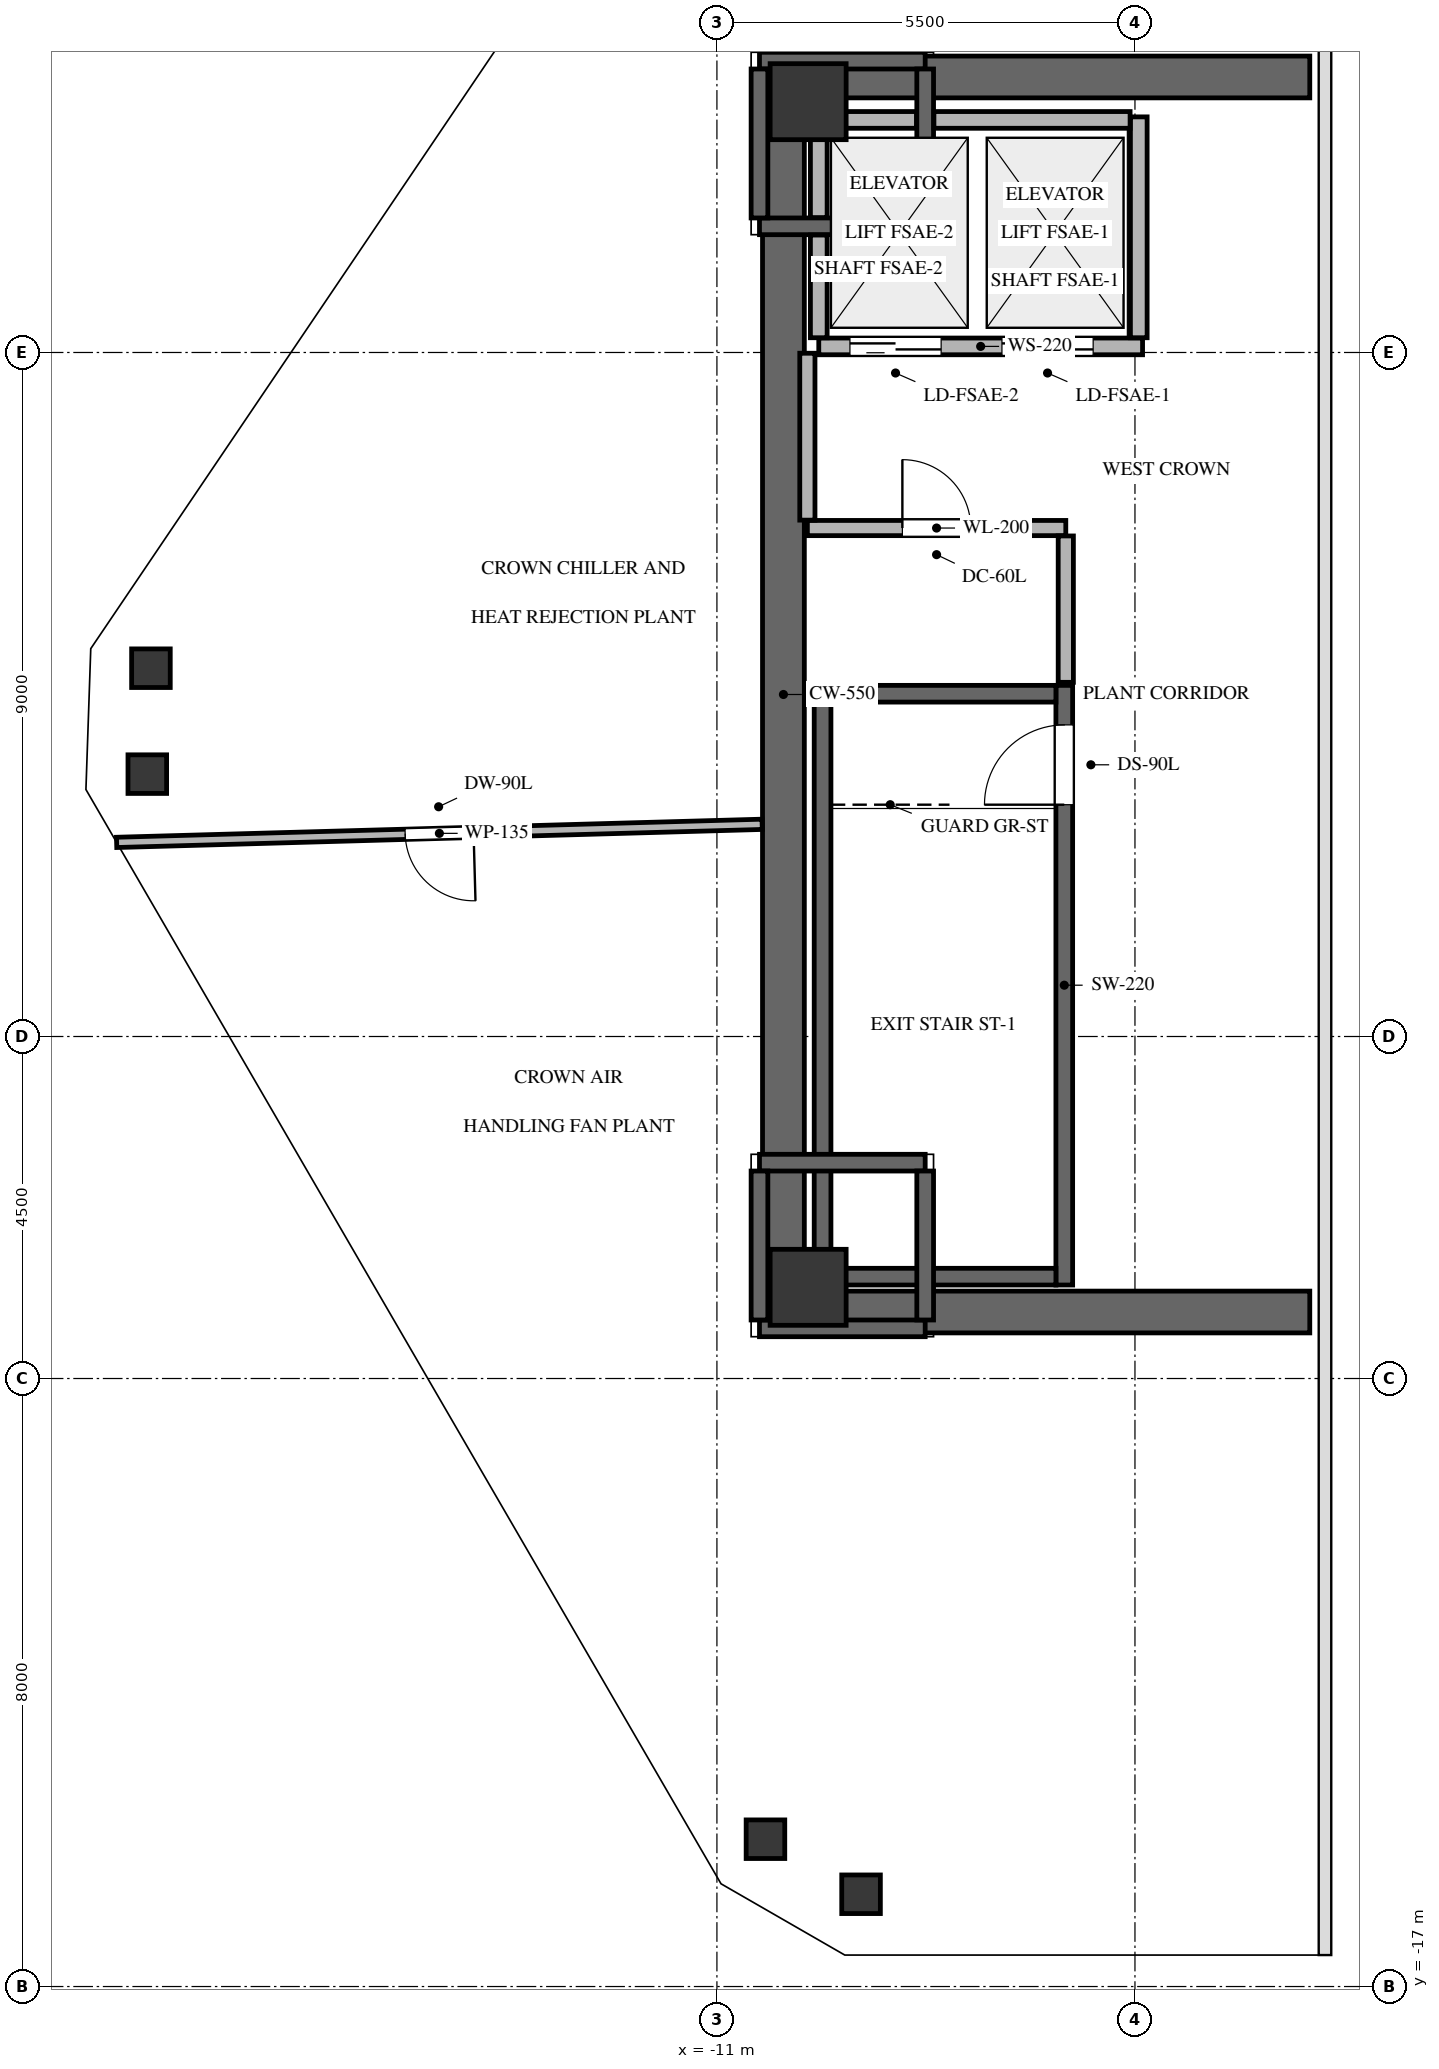
"""IFC4 building model, lengths in metres.
Left out: names, types, materials, properties, quantities, classifications, styles, units other than length and angle.
Written with IfcOpenShell. Run it as: python <this file> out.ifc"""

import sys

from ifc_helpers import new_model, si_unit, direction, frame, frame_2d, origin, origin_2d, place, context, subcontext, project, spatial, rectangle, hollow_circle, extrude, source, transform, mapped, element, fill, save


model = new_model("IFC4")
c1 = context("Model", 3, precision=1e-05, world=origin(), true_north=direction((0.0, 1.0)))
c2 = subcontext(c1, "Body", "Model", "MODEL_VIEW")
j1 = project(units=[si_unit("LENGTHUNIT", "METRE"), si_unit("PLANEANGLEUNIT", "RADIAN")], contexts=[c1])
p1 = place(None, origin())
s1 = spatial("IfcSite", under=j1, at=p1, CompositionType="ELEMENT")
p2 = place(p1, origin())
s2 = spatial("IfcBuilding", under=s1, at=p2, CompositionType="ELEMENT")
p3 = place(p2, frame((0.0, 0.0, 287.0)))
s3 = spatial("IfcBuildingStorey", under=s2, at=p3, CompositionType="ELEMENT", Elevation=287.0)
p4 = place(p3, frame((-10.125, -8.4, 0.0), z_axis=(0.0, 0.0, 1.0), x_axis=(0.0, 1.0, 0.0)))
e1 = element("IfcWall", 1, at=p4, inside=s3, PredefinedType="SHEAR", context=c2, shape_type="SweptSolid", body=[
    extrude(rectangle(XDim=16.8, YDim=0.55, at=frame_2d((8.4, 0.0))), origin(), (0.0, 0.0, 1.0), 5.78),
])
for number, where, z_axis, x_axis in (
    (2, (-9.85, -8.125, 0.0), (0.0, 0.0, 1.0), (1.0, 0.0, 0.0)),
    (3, (-9.85, 8.125, 0.0), (0.0, 0.0, 1.0), (1.0, 0.0, 0.0)),
):
    element("IfcWall", number, at=place(p3, frame(where, z_axis=z_axis, x_axis=x_axis)), inside=s3, PredefinedType="SHEAR", context=c2, shape_type="SweptSolid", body=[
        extrude(rectangle(XDim=6.65, YDim=0.55, at=frame_2d((3.325, 0.0))), origin(), (0.0, 0.0, 1.0), 5.78),
    ])
p5 = place(p3, frame((-6.43, -7.77, -0.28), z_axis=(0.0, 0.0, 1.0), x_axis=(0.0, 1.0, 0.0)))
e4 = element("IfcWall", 4, at=p5, inside=s3, PredefinedType="SHEAR", context=c2, shape_type="SweptSolid", body=[
    extrude(rectangle(XDim=7.89, YDim=0.22, at=frame_2d((3.945, 0.0))), origin(), (0.0, 0.0, 1.0), 5.0),
])
p6 = place(p5, frame((6.32, 0.0, 0.0)))
e5 = element("IfcOpeningElement", 5, at=p6, cuts=e4, PredefinedType="OPENING", context=c2, shape_type="SweptSolid", body=[
    extrude(rectangle(XDim=1.05, YDim=2.15, at=frame_2d((0.525, 1.075))), frame((0.0, 0.12, 0.0), z_axis=(0.0, -1.0, 0.0), x_axis=(1.0, 0.0, 0.0)), (0.0, 0.0, 1.0), 0.24),
])
p7 = place(p3, frame((-9.61, 0.12, -0.28), z_axis=(0.0, 0.0, 1.0), x_axis=(0.0, -1.0, 0.0)))
e6 = element("IfcWall", 6, at=p7, inside=s3, PredefinedType="SHEAR", context=c2, shape_type="SweptSolid", body=[
    extrude(rectangle(XDim=7.89, YDim=0.22, at=frame_2d((3.945, 0.0))), origin(), (0.0, 0.0, 1.0), 5.0),
])
for number, where, z_axis, x_axis in (
    (7, (-9.5, -7.66, -0.28), (0.0, 0.0, 1.0), (1.0, 0.0, 0.0)),
    (8, (-6.54, 0.01, -0.28), (0.0, 0.0, 1.0), (-1.0, 0.0, 0.0)),
):
    element("IfcWall", number, at=place(p3, frame(where, z_axis=z_axis, x_axis=x_axis)), inside=s3, PredefinedType="SHEAR", context=c2, shape_type="SweptSolid", body=[
        extrude(rectangle(XDim=2.96, YDim=0.22, at=frame_2d((1.48, 0.0))), origin(), (0.0, 0.0, 1.0), 5.0),
    ])
m1 = source(origin(), c2, "Body", "SweptSolid", [
    extrude(rectangle(XDim=1.0, YDim=1.0, at=origin_2d()), origin(), (0.0, 0.0, 1.0), 5.0),
])
for number, where, z_axis, x_axis in (
    (9, (-9.8, -7.8, -0.28), (0.0, 0.0, 1.0), (1.0, 0.0, 0.0)),
    (10, (-9.8, 7.8, -0.28), (0.0, 0.0, 1.0), (1.0, 0.0, 0.0)),
):
    element("IfcColumn", number, at=place(p3, frame(where, z_axis=z_axis, x_axis=x_axis)), inside=s3, PredefinedType="COLUMN", context=c2, shape_type="MappedRepresentation", body=[
        mapped(m1, transform((0.0, 0.0, 0.0), x_axis=(1.0, 0.0, 0.0), y_axis=(0.0, 1.0, 0.0), z_axis=(0.0, 0.0, 1.0), scale=1.0)),
    ])
m2 = source(origin(), c2, "Body", "SweptSolid", [
    extrude(hollow_circle(Radius=0.254, WallThickness=0.012, at=origin_2d()), origin(), (0.0, 0.0, 1.0), 5.0),
])
for number, where, z_axis, x_axis in (
    (11, (-10.361, -15.062, -0.28), (0.0, 0.0, 1.0), (1.0, 0.0, 0.0)),
    (12, (-18.494, -1.048, -0.28), (0.0, 0.0, 1.0), (1.0, 0.0, 0.0)),
    (13, (-18.446, 0.346, -0.28), (0.0, 0.0, 1.0), (1.0, 0.0, 0.0)),
    (14, (-9.104, -15.786, -0.28), (0.0, 0.0, 1.0), (1.0, 0.0, 0.0)),
):
    element("IfcColumn", number, at=place(p3, frame(where, z_axis=z_axis, x_axis=x_axis)), inside=s3, PredefinedType="COLUMN", context=c2, shape_type="MappedRepresentation", body=[
        mapped(m2, transform((0.0, 0.0, 0.0), x_axis=(1.0, 0.0, 0.0), y_axis=(0.0, 1.0, 0.0), z_axis=(0.0, 0.0, 1.0), scale=1.0)),
    ])
for number, where, z_axis, x_axis in (
    (15, (-10.44, -8.34, 5.82), (0.0, 0.0, 1.0), (1.0, 0.0, 0.0)),
    (16, (-10.44, -6.16, 5.82), (0.0, 0.0, 1.0), (1.0, 0.0, 0.0)),
):
    element("IfcWall", number, at=place(p3, frame(where, z_axis=z_axis, x_axis=x_axis)), inside=s3, PredefinedType="SHEAR", context=c2, shape_type="SweptSolid", body=[
        extrude(rectangle(XDim=2.18, YDim=0.22, at=frame_2d((1.09, 0.0))), origin(), (0.0, 0.0, 1.0), 3.57),
    ])
for number, where, z_axis, x_axis in (
    (17, (-10.44, -8.23, 5.82), (0.0, 0.0, 1.0), (0.0, 1.0, 0.0)),
    (18, (-8.26, -8.23, 5.82), (0.0, 0.0, 1.0), (0.0, 1.0, 0.0)),
):
    element("IfcWall", number, at=place(p3, frame(where, z_axis=z_axis, x_axis=x_axis)), inside=s3, PredefinedType="SHEAR", context=c2, shape_type="SweptSolid", body=[
        extrude(rectangle(XDim=1.96, YDim=0.22, at=frame_2d((0.98, 0.0))), origin(), (0.0, 0.0, 1.0), 3.57),
    ])
for number, where, z_axis, x_axis in (
    (19, (-10.44, 6.16, 5.82), (0.0, 0.0, 1.0), (1.0, 0.0, 0.0)),
    (20, (-10.44, 8.34, 5.82), (0.0, 0.0, 1.0), (1.0, 0.0, 0.0)),
):
    element("IfcWall", number, at=place(p3, frame(where, z_axis=z_axis, x_axis=x_axis)), inside=s3, PredefinedType="SHEAR", context=c2, shape_type="SweptSolid", body=[
        extrude(rectangle(XDim=2.18, YDim=0.22, at=frame_2d((1.09, 0.0))), origin(), (0.0, 0.0, 1.0), 3.57),
    ])
for number, where, z_axis, x_axis in (
    (21, (-10.44, 6.27, 5.82), (0.0, 0.0, 1.0), (0.0, 1.0, 0.0)),
    (22, (-8.26, 6.27, 5.82), (0.0, 0.0, 1.0), (0.0, 1.0, 0.0)),
):
    element("IfcWall", number, at=place(p3, frame(where, z_axis=z_axis, x_axis=x_axis)), inside=s3, PredefinedType="SHEAR", context=c2, shape_type="SweptSolid", body=[
        extrude(rectangle(XDim=1.96, YDim=0.22, at=frame_2d((0.98, 0.0))), origin(), (0.0, 0.0, 1.0), 3.57),
    ])
p8 = place(p3, frame((-9.66, 4.58, 0.0), z_axis=(0.0, 0.0, 1.0), x_axis=(1.0, 0.0, 0.0)))
e23 = element("IfcWall", 23, at=p8, inside=s3, PredefinedType="SOLIDWALL", context=c2, shape_type="SweptSolid", body=[
    extrude(rectangle(XDim=4.26, YDim=0.22, at=frame_2d((2.13, 0.0))), origin(), (0.0, 0.0, 1.0), 4.705),
])
p9 = place(p8, frame((0.41, 0.0, 0.0)))
e24 = element("IfcOpeningElement", 24, at=p9, cuts=e23, PredefinedType="OPENING", context=c2, shape_type="SweptSolid", body=[
    extrude(rectangle(XDim=1.2, YDim=2.15, at=frame_2d((0.6, 1.075))), frame((0.0, 0.12, 0.0), z_axis=(0.0, -1.0, 0.0), x_axis=(1.0, 0.0, 0.0)), (0.0, 0.0, 1.0), 0.24),
])
p10 = place(p8, frame((2.41, 0.0, 0.0)))
e25 = element("IfcOpeningElement", 25, at=p10, cuts=e23, PredefinedType="OPENING", context=c2, shape_type="SweptSolid", body=[
    extrude(rectangle(XDim=1.2, YDim=2.15, at=frame_2d((0.6, 1.075))), frame((0.0, 0.12, 0.0), z_axis=(0.0, -1.0, 0.0), x_axis=(1.0, 0.0, 0.0)), (0.0, 0.0, 1.0), 0.24),
])
p11 = place(p3, frame((-5.45, 4.694, 0.0), z_axis=(0.0, 0.0, 1.0), x_axis=(0.0, 1.0, 0.0)))
e26 = element("IfcWall", 26, at=p11, inside=s3, PredefinedType="SOLIDWALL", context=c2, shape_type="SweptSolid", body=[
    extrude(rectangle(XDim=2.906, YDim=0.22, at=frame_2d((1.453, 0.0))), origin(), (0.0, 0.0, 1.0), 4.705),
])
p12 = place(p3, frame((-9.66, 7.56, 0.0), z_axis=(0.0, 0.0, 1.0), x_axis=(1.0, 0.0, 0.0)))
e27 = element("IfcWall", 27, at=p12, inside=s3, PredefinedType="SOLIDWALL", context=c2, shape_type="SweptSolid", body=[
    extrude(rectangle(XDim=1.285, YDim=0.22, at=frame_2d((0.643, 0.0))), origin(), (0.0, 0.0, 1.0), 4.705),
])
p13 = place(p3, frame((-8.145, 7.56, 0.0), z_axis=(0.0, 0.0, 1.0), x_axis=(1.0, 0.0, 0.0)))
e28 = element("IfcWall", 28, at=p13, inside=s3, PredefinedType="SOLIDWALL", context=c2, shape_type="SweptSolid", body=[
    extrude(rectangle(XDim=2.581, YDim=0.22, at=frame_2d((1.291, 0.0))), origin(), (0.0, 0.0, 1.0), 4.705),
])
p14 = place(p3, frame((-9.66, 4.694, 0.0), z_axis=(0.0, 0.0, 1.0), x_axis=(0.0, 1.0, 0.0)))
e29 = element("IfcWall", 29, at=p14, inside=s3, PredefinedType="SOLIDWALL", context=c2, shape_type="SweptSolid", body=[
    extrude(rectangle(XDim=1.351, YDim=0.22, at=frame_2d((0.675, 0.0))), origin(), (0.0, 0.0, 1.0), 4.705),
])
p15 = place(p3, frame((-9.66, 6.275, 0.0), z_axis=(0.0, 0.0, 1.0), x_axis=(0.0, 1.0, 0.0)))
e30 = element("IfcWall", 30, at=p15, inside=s3, PredefinedType="SOLIDWALL", context=c2, shape_type="SweptSolid", body=[
    extrude(rectangle(XDim=1.171, YDim=0.22, at=frame_2d((0.585, 0.0))), origin(), (0.0, 0.0, 1.0), 4.705),
])
p16 = place(p3, frame((-9.81, 2.19, 0.0), z_axis=(0.0, 0.0, 1.0), x_axis=(1.0, 0.0, 0.0)))
e31 = element("IfcWall", 31, at=p16, inside=s3, PredefinedType="SOLIDWALL", context=c2, shape_type="SweptSolid", body=[
    extrude(rectangle(XDim=3.4, YDim=0.2, at=frame_2d((1.7, 0.0))), origin(), (0.0, 0.0, 1.0), 4.705),
])
p17 = place(p16, frame((1.25, 0.0, 0.0)))
e32 = element("IfcOpeningElement", 32, at=p17, cuts=e31, PredefinedType="OPENING", context=c2, shape_type="SweptSolid", body=[
    extrude(rectangle(XDim=0.9, YDim=2.05, at=frame_2d((0.45, 1.025))), frame((0.0, 0.11, 0.0), z_axis=(0.0, -1.0, 0.0), x_axis=(1.0, 0.0, 0.0)), (0.0, 0.0, 1.0), 0.22),
])
p18 = place(p3, frame((-9.81, 4.49, 0.0), z_axis=(0.0, 0.0, 1.0), x_axis=(0.0, -1.0, 0.0)))
e33 = element("IfcWall", 33, at=p18, inside=s3, PredefinedType="SOLIDWALL", context=c2, shape_type="SweptSolid", body=[
    extrude(rectangle(XDim=2.196, YDim=0.2, at=frame_2d((1.098, 0.0))), origin(), (0.0, 0.0, 1.0), 4.705),
])
p19 = place(p3, frame((-6.41, 2.086, 0.0), z_axis=(0.0, 0.0, 1.0), x_axis=(0.0, -1.0, 0.0)))
e34 = element("IfcWall", 34, at=p19, inside=s3, PredefinedType="SOLIDWALL", context=c2, shape_type="SweptSolid", body=[
    extrude(rectangle(XDim=1.926, YDim=0.2, at=frame_2d((0.963, 0.0))), origin(), (0.0, 0.0, 1.0), 4.705),
])
p20 = place(p3, frame((-10.405, -1.708, 0.0), z_axis=(0.0, 0.0, 1.0), x_axis=(-0.999607454952, -0.028016709362, 0.0)))
e35 = element("IfcWall", 35, at=p20, inside=s3, PredefinedType="PARTITIONING", context=c2, shape_type="SweptSolid", body=[
    extrude(rectangle(XDim=8.496, YDim=0.135, at=frame_2d((4.248, 0.0))), origin(), (0.0, 0.0, 1.0), 4.059),
])
p21 = place(p20, frame((3.798, 0.0, 0.0)))
e36 = element("IfcOpeningElement", 36, at=p21, cuts=e35, PredefinedType="OPENING", context=c2, shape_type="SweptSolid", body=[
    extrude(rectangle(XDim=0.9, YDim=2.05, at=frame_2d((0.45, 1.025))), frame((0.0, 0.078, 0.0), z_axis=(0.0, -1.0, 0.0), x_axis=(1.0, 0.0, 0.0)), (0.0, 0.0, 1.0), 0.155),
])
p22 = place(p3, frame((-9.35, -7.25, 9.649)))
p23 = place(p22, frame((0.0, 0.0, 0.276)))
e37 = element("IfcWindow", 37, at=p23, inside=s3, PartitioningType="SINGLE_PANEL", PredefinedType="SKYLIGHT", context=c2, shape_type="SweptSolid", body=[
    extrude(rectangle(XDim=1.4, YDim=1.4, at=origin_2d()), origin(), (0.0, 0.0, 1.0), 0.05),
])
p24 = place(p3, frame((-9.35, 7.25, 9.649)))
p25 = place(p24, frame((0.0, 0.0, 0.276)))
e38 = element("IfcWindow", 38, at=p25, inside=s3, PartitioningType="SINGLE_PANEL", PredefinedType="SKYLIGHT", context=c2, shape_type="SweptSolid", body=[
    extrude(rectangle(XDim=1.2, YDim=1.2, at=origin_2d()), origin(), (0.0, 0.0, 1.0), 0.05),
])
m3 = source(origin(), c2, "Body", "SweptSolid", [
    extrude(rectangle(XDim=1.05, YDim=2.15, at=frame_2d((0.525, 1.075))), frame((0.0, 0.025, 0.0), z_axis=(0.0, -1.0, 0.0), x_axis=(1.0, 0.0, 0.0)), (0.0, 0.0, 1.0), 0.05),
])
p26 = place(p6, origin())
e39 = element("IfcDoor", 39, at=p26, inside=s3, OperationType="SINGLE_SWING_LEFT", PredefinedType="DOOR", context=c2, shape_type="MappedRepresentation", body=[
    mapped(m3, transform((0.0, 0.0, 0.0), x_axis=(1.0, 0.0, 0.0), y_axis=(0.0, 1.0, 0.0), z_axis=(0.0, 0.0, 1.0), scale=1.0)),
])
fill(e5, e39)
m4 = source(origin(), c2, "Body", "SweptSolid", [
    extrude(rectangle(XDim=1.2, YDim=2.15, at=frame_2d((0.6, 1.075))), frame((0.0, 0.025, 0.0), z_axis=(0.0, -1.0, 0.0), x_axis=(1.0, 0.0, 0.0)), (0.0, 0.0, 1.0), 0.05),
])
p27 = place(p9, origin())
e40 = element("IfcDoor", 40, at=p27, inside=s3, OperationType="DOUBLE_DOOR_SLIDING", PredefinedType="DOOR", context=c2, shape_type="MappedRepresentation", body=[
    mapped(m4, transform((0.0, 0.0, 0.0), x_axis=(1.0, 0.0, 0.0), y_axis=(0.0, 1.0, 0.0), z_axis=(0.0, 0.0, 1.0), scale=1.0)),
])
fill(e24, e40)
p28 = place(p10, origin())
e41 = element("IfcDoor", 41, at=p28, inside=s3, OperationType="DOUBLE_DOOR_SLIDING", PredefinedType="DOOR", context=c2, shape_type="MappedRepresentation", body=[
    mapped(m4, transform((0.0, 0.0, 0.0), x_axis=(1.0, 0.0, 0.0), y_axis=(0.0, 1.0, 0.0), z_axis=(0.0, 0.0, 1.0), scale=1.0)),
])
fill(e25, e41)
m5 = source(origin(), c2, "Body", "SweptSolid", [
    extrude(rectangle(XDim=0.9, YDim=2.05, at=frame_2d((0.45, 1.025))), frame((0.0, 0.025, 0.0), z_axis=(0.0, -1.0, 0.0), x_axis=(1.0, 0.0, 0.0)), (0.0, 0.0, 1.0), 0.05),
])
p29 = place(p17, origin())
e42 = element("IfcDoor", 42, at=p29, inside=s3, OperationType="SINGLE_SWING_LEFT", PredefinedType="DOOR", context=c2, shape_type="MappedRepresentation", body=[
    mapped(m5, transform((0.0, 0.0, 0.0), x_axis=(1.0, 0.0, 0.0), y_axis=(0.0, 1.0, 0.0), z_axis=(0.0, 0.0, 1.0), scale=1.0)),
])
fill(e32, e42)
m6 = source(origin(), c2, "Body", "SweptSolid", [
    extrude(rectangle(XDim=0.9, YDim=2.05, at=frame_2d((0.45, 1.025))), frame((0.0, 0.025, 0.0), z_axis=(0.0, -1.0, 0.0), x_axis=(1.0, 0.0, 0.0)), (0.0, 0.0, 1.0), 0.05),
])
p30 = place(p21, origin())
e43 = element("IfcDoor", 43, at=p30, inside=s3, OperationType="SINGLE_SWING_LEFT", PredefinedType="DOOR", context=c2, shape_type="MappedRepresentation", body=[
    mapped(m6, transform((0.0, 0.0, 0.0), x_axis=(1.0, 0.0, 0.0), y_axis=(0.0, 1.0, 0.0), z_axis=(0.0, 0.0, 1.0), scale=1.0)),
])
fill(e36, e43)
save(model, sys.argv[1])
